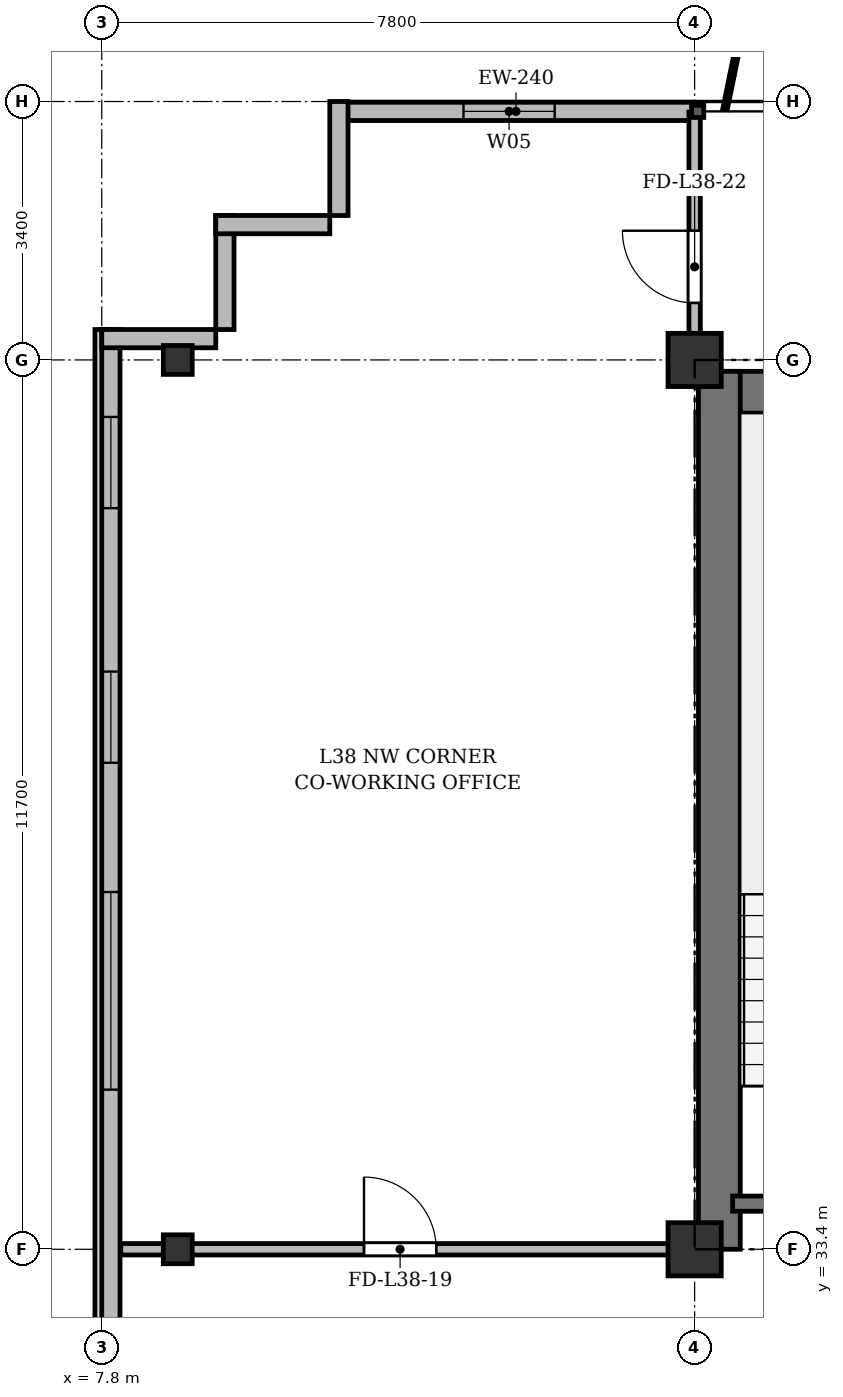
"""IFC4 building model, lengths in metres.
Left out: names, types, materials, properties, quantities, classifications, styles, units other than length and angle.
Written with IfcOpenShell. Run it as: python <this file> out.ifc"""

import sys

from ifc_helpers import new_model, si_unit, direction, frame, frame_2d, origin, origin_2d, place, context, subcontext, project, spatial, rectangle, i_section, extrude, source, transform, mapped, element, fill, save


model = new_model("IFC4")
c1 = context("Model", 3, precision=1e-05, world=origin(), true_north=direction((0.0, 1.0)))
c2 = subcontext(c1, "Body", "Model", "MODEL_VIEW")
j1 = project(units=[si_unit("LENGTHUNIT", "METRE"), si_unit("PLANEANGLEUNIT", "RADIAN")], contexts=[c1])
p1 = place(None, origin())
s1 = spatial("IfcSite", under=j1, at=p1, CompositionType="ELEMENT")
p2 = place(p1, origin())
s2 = spatial("IfcBuilding", under=s1, at=p2, CompositionType="ELEMENT")
p3 = place(p2, frame((0.0, 0.0, 146.5)))
s3 = spatial("IfcBuildingStorey", under=s2, at=p3, CompositionType="ELEMENT", Elevation=146.5)
m1 = source(origin(), c2, "Body", "SweptSolid", [
    extrude(i_section(OverallWidth=0.38, OverallDepth=0.38, WebThickness=0.02, FlangeThickness=0.03, at=origin_2d()), origin(), (0.0, 0.0, 1.0), 3.6),
])
for number, where, z_axis, x_axis in (
    (1, (8.8, 33.4, 0.0), (0.0, 0.0, 1.0), (1.0, 0.0, 0.0)),
    (2, (8.8, 45.1, 0.0), (0.0, 0.0, 1.0), (1.0, 0.0, 0.0)),
):
    element("IfcColumn", number, at=place(p3, frame(where, z_axis=z_axis, x_axis=x_axis)), inside=s3, PredefinedType="COLUMN", context=c2, shape_type="MappedRepresentation", body=[
        mapped(m1, transform((0.0, 0.0, 0.0), x_axis=(1.0, 0.0, 0.0), y_axis=(0.0, 1.0, 0.0), z_axis=(0.0, 0.0, 1.0), scale=1.0)),
    ])
m2 = source(origin(), c2, "Body", "SweptSolid", [
    extrude(rectangle(XDim=0.7, YDim=0.7, at=origin_2d()), origin(), (0.0, 0.0, 1.0), 3.6),
])
for number, where, z_axis, x_axis in (
    (3, (15.6, 33.4, 0.0), (0.0, 0.0, 1.0), (1.0, 0.0, 0.0)),
    (4, (15.6, 45.1, 0.0), (0.0, 0.0, 1.0), (1.0, 0.0, 0.0)),
):
    element("IfcColumn", number, at=place(p3, frame(where, z_axis=z_axis, x_axis=x_axis)), inside=s3, PredefinedType="COLUMN", context=c2, shape_type="MappedRepresentation", body=[
        mapped(m2, transform((0.0, 0.0, 0.0), x_axis=(1.0, 0.0, 0.0), y_axis=(0.0, 1.0, 0.0), z_axis=(0.0, 0.0, 1.0), scale=1.0)),
    ])
p4 = place(p3, frame((10.9, 48.37, 0.0), z_axis=(0.0, 0.0, 1.0), x_axis=(1.0, 0.0, 0.0)))
e5 = element("IfcWall", 5, at=p4, inside=s3, PredefinedType="SOLIDWALL", context=c2, shape_type="SweptSolid", body=[
    extrude(rectangle(XDim=4.7, YDim=0.24, at=frame_2d((2.35, 0.0))), origin(), (0.0, 0.0, 1.0), 3.35),
])
p5 = place(p4, frame((1.659, 0.0, 0.9)))
e6 = element("IfcOpeningElement", 6, at=p5, cuts=e5, PredefinedType="OPENING", context=c2, shape_type="SweptSolid", body=[
    extrude(rectangle(XDim=1.2, YDim=1.65, at=frame_2d((0.6, 0.825))), frame((0.0, 0.13, 0.0), z_axis=(0.0, -1.0, 0.0), x_axis=(1.0, 0.0, 0.0)), (0.0, 0.0, 1.0), 0.26),
])
p6 = place(p3, frame((7.92, 6.3, 0.0), z_axis=(0.0, 0.0, 1.0), x_axis=(0.0, 1.0, 0.0)))
e7 = element("IfcWall", 7, at=p6, inside=s3, PredefinedType="SOLIDWALL", context=c2, shape_type="SweptSolid", body=[
    extrude(rectangle(XDim=39.2, YDim=0.24, at=frame_2d((19.6, 0.0))), origin(), (0.0, 0.0, 1.0), 3.35),
])
p7 = place(p6, frame((1.45, 0.0, 0.92)))
e8 = element("IfcOpeningElement", 8, at=p7, cuts=e7, PredefinedType="OPENING", context=c2, shape_type="SweptSolid", body=[
    extrude(rectangle(XDim=1.2, YDim=1.65, at=frame_2d((0.6, 0.825))), frame((0.0, 0.13, 0.0), z_axis=(0.0, -1.0, 0.0), x_axis=(1.0, 0.0, 0.0)), (0.0, 0.0, 1.0), 0.26),
])
p8 = place(p6, frame((3.8, 0.0, 0.92)))
e9 = element("IfcOpeningElement", 9, at=p8, cuts=e7, PredefinedType="OPENING", context=c2, shape_type="SweptSolid", body=[
    extrude(rectangle(XDim=2.6, YDim=1.9, at=frame_2d((1.3, 0.95))), frame((0.0, 0.13, 0.0), z_axis=(0.0, -1.0, 0.0), x_axis=(1.0, 0.0, 0.0)), (0.0, 0.0, 1.0), 0.26),
])
p9 = place(p6, frame((8.0, 0.0, 0.92)))
e10 = element("IfcOpeningElement", 10, at=p9, cuts=e7, PredefinedType="OPENING", context=c2, shape_type="SweptSolid", body=[
    extrude(rectangle(XDim=2.6, YDim=1.9, at=frame_2d((1.3, 0.95))), frame((0.0, 0.13, 0.0), z_axis=(0.0, -1.0, 0.0), x_axis=(1.0, 0.0, 0.0)), (0.0, 0.0, 1.0), 0.26),
])
p10 = place(p6, frame((15.2, 0.0, 0.92)))
e11 = element("IfcOpeningElement", 11, at=p10, cuts=e7, PredefinedType="OPENING", context=c2, shape_type="SweptSolid", body=[
    extrude(rectangle(XDim=2.6, YDim=1.9, at=frame_2d((1.3, 0.95))), frame((0.0, 0.13, 0.0), z_axis=(0.0, -1.0, 0.0), x_axis=(1.0, 0.0, 0.0)), (0.0, 0.0, 1.0), 0.26),
])
p11 = place(p6, frame((29.2, 0.0, 0.92)))
e12 = element("IfcOpeningElement", 12, at=p11, cuts=e7, PredefinedType="OPENING", context=c2, shape_type="SweptSolid", body=[
    extrude(rectangle(XDim=2.6, YDim=1.9, at=frame_2d((1.3, 0.95))), frame((0.0, 0.13, 0.0), z_axis=(0.0, -1.0, 0.0), x_axis=(1.0, 0.0, 0.0)), (0.0, 0.0, 1.0), 0.26),
])
p12 = place(p6, frame((33.5, 0.0, 0.92)))
e13 = element("IfcOpeningElement", 13, at=p12, cuts=e7, PredefinedType="OPENING", context=c2, shape_type="SweptSolid", body=[
    extrude(rectangle(XDim=1.2, YDim=1.65, at=frame_2d((0.6, 0.825))), frame((0.0, 0.13, 0.0), z_axis=(0.0, -1.0, 0.0), x_axis=(1.0, 0.0, 0.0)), (0.0, 0.0, 1.0), 0.26),
])
p13 = place(p6, frame((36.85, 0.0, 0.92)))
e14 = element("IfcOpeningElement", 14, at=p13, cuts=e7, PredefinedType="OPENING", context=c2, shape_type="SweptSolid", body=[
    extrude(rectangle(XDim=1.2, YDim=1.65, at=frame_2d((0.6, 0.825))), frame((0.0, 0.13, 0.0), z_axis=(0.0, -1.0, 0.0), x_axis=(1.0, 0.0, 0.0)), (0.0, 0.0, 1.0), 0.26),
])
for number, where, z_axis, x_axis in (
    (15, (7.8, 45.38, 0.0), (0.0, 0.0, 1.0), (1.0, 0.0, 0.0)),
    (16, (9.42, 45.5, 0.0), (0.0, 0.0, 1.0), (0.0, 1.0, 0.0)),
    (17, (9.3, 46.88, 0.0), (0.0, 0.0, 1.0), (1.0, 0.0, 0.0)),
    (18, (10.92, 47.0, 0.0), (0.0, 0.0, 1.0), (0.0, 1.0, 0.0)),
):
    element("IfcWall", number, at=place(p3, frame(where, z_axis=z_axis, x_axis=x_axis)), inside=s3, PredefinedType="SOLIDWALL", context=c2, shape_type="SweptSolid", body=[
        extrude(rectangle(XDim=1.5, YDim=0.24, at=frame_2d((0.75, 0.0))), origin(), (0.0, 0.0, 1.0), 3.35),
    ])
p14 = place(p3, frame((15.65, 44.675, 0.0), z_axis=(0.0, 0.0, 1.0), x_axis=(1.0, 0.0, 0.0)))
e19 = element("IfcWall", 19, at=p14, inside=s3, PredefinedType="SHEAR", context=c2, shape_type="SweptSolid", body=[
    extrude(rectangle(XDim=43.1, YDim=0.55, at=frame_2d((21.55, 0.0))), origin(), (0.0, 0.0, 1.0), 3.35),
])
p15 = place(p3, frame((15.925, 33.4, 0.0), z_axis=(0.0, 0.0, 1.0), x_axis=(0.0, 1.0, 0.0)))
e20 = element("IfcWall", 20, at=p15, inside=s3, PredefinedType="SHEAR", context=c2, shape_type="SweptSolid", body=[
    extrude(rectangle(XDim=11.55, YDim=0.55, at=frame_2d((5.775, 0.0))), origin(), (0.0, 0.0, 1.0), 3.35),
])
p16 = place(p3, frame((16.1, 34.0, 0.0), z_axis=(0.0, 0.0, 1.0), x_axis=(1.0, 0.0, 0.0)))
e21 = element("IfcWall", 21, at=p16, inside=s3, PredefinedType="SHEAR", context=c2, shape_type="SweptSolid", body=[
    extrude(rectangle(XDim=3.4, YDim=0.2, at=frame_2d((1.7, 0.0))), origin(), (0.0, 0.0, 1.0), 3.35),
])
p17 = place(p3, frame((8.05, 33.4, 0.0), z_axis=(0.0, 0.0, 1.0), x_axis=(1.0, 0.0, 0.0)))
e22 = element("IfcWall", 22, at=p17, inside=s3, PredefinedType="PARTITIONING", context=c2, shape_type="SweptSolid", body=[
    extrude(rectangle(XDim=7.55, YDim=0.15, at=frame_2d((3.775, 0.0))), origin(), (0.0, 0.0, 1.0), 2.75),
])
p18 = place(p17, frame((3.2, 0.0, 0.0)))
e23 = element("IfcOpeningElement", 23, at=p18, cuts=e22, PredefinedType="OPENING", context=c2, shape_type="SweptSolid", body=[
    extrude(rectangle(XDim=0.95, YDim=2.15, at=frame_2d((0.475, 1.075))), frame((0.0, 0.085, 0.0), z_axis=(0.0, -1.0, 0.0), x_axis=(1.0, 0.0, 0.0)), (0.0, 0.0, 1.0), 0.17),
])
p19 = place(p3, frame((15.6, 44.75, 0.0), z_axis=(0.0, 0.0, 1.0), x_axis=(0.0, 1.0, 0.0)))
e24 = element("IfcWall", 24, at=p19, inside=s3, PredefinedType="PARTITIONING", context=c2, shape_type="SweptSolid", body=[
    extrude(rectangle(XDim=3.61, YDim=0.15, at=frame_2d((1.805, 0.0))), origin(), (0.0, 0.0, 1.0), 2.85),
])
p20 = place(p19, frame((1.1, 0.0, 0.0)))
e25 = element("IfcOpeningElement", 25, at=p20, cuts=e24, PredefinedType="OPENING", context=c2, shape_type="SweptSolid", body=[
    extrude(rectangle(XDim=0.95, YDim=2.15, at=frame_2d((0.475, 1.075))), frame((0.0, 0.085, 0.0), z_axis=(0.0, -1.0, 0.0), x_axis=(1.0, 0.0, 0.0)), (0.0, 0.0, 1.0), 0.17),
])
m3 = source(origin(), c2, "Body", "SweptSolid", [
    extrude(rectangle(XDim=1.2, YDim=1.65, at=frame_2d((0.6, 0.825))), frame((0.0, 0.03, 0.0), z_axis=(0.0, -1.0, 0.0), x_axis=(1.0, 0.0, 0.0)), (0.0, 0.0, 1.0), 0.06),
])
p21 = place(p5, origin())
e26 = element("IfcWindow", 26, at=p21, inside=s3, PartitioningType="SINGLE_PANEL", PredefinedType="WINDOW", context=c2, shape_type="MappedRepresentation", body=[
    mapped(m3, transform((0.0, 0.0, 0.0), x_axis=(1.0, 0.0, 0.0), y_axis=(0.0, 1.0, 0.0), z_axis=(0.0, 0.0, 1.0), scale=1.0)),
])
fill(e6, e26)
m4 = source(origin(), c2, "Body", "SweptSolid", [
    extrude(rectangle(XDim=2.6, YDim=1.9, at=frame_2d((1.3, 0.95))), frame((0.0, 0.03, 0.0), z_axis=(0.0, -1.0, 0.0), x_axis=(1.0, 0.0, 0.0)), (0.0, 0.0, 1.0), 0.06),
])
p22 = place(p11, origin())
e27 = element("IfcWindow", 27, at=p22, inside=s3, PartitioningType="SINGLE_PANEL", PredefinedType="WINDOW", context=c2, shape_type="MappedRepresentation", body=[
    mapped(m4, transform((0.0, 0.0, 0.0), x_axis=(1.0, 0.0, 0.0), y_axis=(0.0, 1.0, 0.0), z_axis=(0.0, 0.0, 1.0), scale=1.0)),
])
fill(e12, e27)
p23 = place(p12, origin())
e28 = element("IfcWindow", 28, at=p23, inside=s3, PartitioningType="SINGLE_PANEL", PredefinedType="WINDOW", context=c2, shape_type="MappedRepresentation", body=[
    mapped(m3, transform((0.0, 0.0, 0.0), x_axis=(1.0, 0.0, 0.0), y_axis=(0.0, 1.0, 0.0), z_axis=(0.0, 0.0, 1.0), scale=1.0)),
])
fill(e13, e28)
p24 = place(p13, origin())
e29 = element("IfcWindow", 29, at=p24, inside=s3, PartitioningType="SINGLE_PANEL", PredefinedType="WINDOW", context=c2, shape_type="MappedRepresentation", body=[
    mapped(m3, transform((0.0, 0.0, 0.0), x_axis=(1.0, 0.0, 0.0), y_axis=(0.0, 1.0, 0.0), z_axis=(0.0, 0.0, 1.0), scale=1.0)),
])
fill(e14, e29)
m5 = source(origin(), c2, "Body", "SweptSolid", [
    extrude(rectangle(XDim=0.95, YDim=2.15, at=frame_2d((0.475, 1.075))), frame((0.0, 0.025, 0.0), z_axis=(0.0, -1.0, 0.0), x_axis=(1.0, 0.0, 0.0)), (0.0, 0.0, 1.0), 0.05),
])
p25 = place(p18, origin())
e30 = element("IfcDoor", 30, at=p25, inside=s3, OperationType="SINGLE_SWING_LEFT", PredefinedType="DOOR", context=c2, shape_type="MappedRepresentation", body=[
    mapped(m5, transform((0.0, 0.0, 0.0), x_axis=(1.0, 0.0, 0.0), y_axis=(0.0, 1.0, 0.0), z_axis=(0.0, 0.0, 1.0), scale=1.0)),
])
fill(e23, e30)
p26 = place(p20, origin())
e31 = element("IfcDoor", 31, at=p26, inside=s3, OperationType="SINGLE_SWING_RIGHT", PredefinedType="DOOR", context=c2, shape_type="MappedRepresentation", body=[
    mapped(m5, transform((0.0, 0.0, 0.0), x_axis=(1.0, 0.0, 0.0), y_axis=(0.0, 1.0, 0.0), z_axis=(0.0, 0.0, 1.0), scale=1.0)),
])
fill(e25, e31)
save(model, sys.argv[1])
